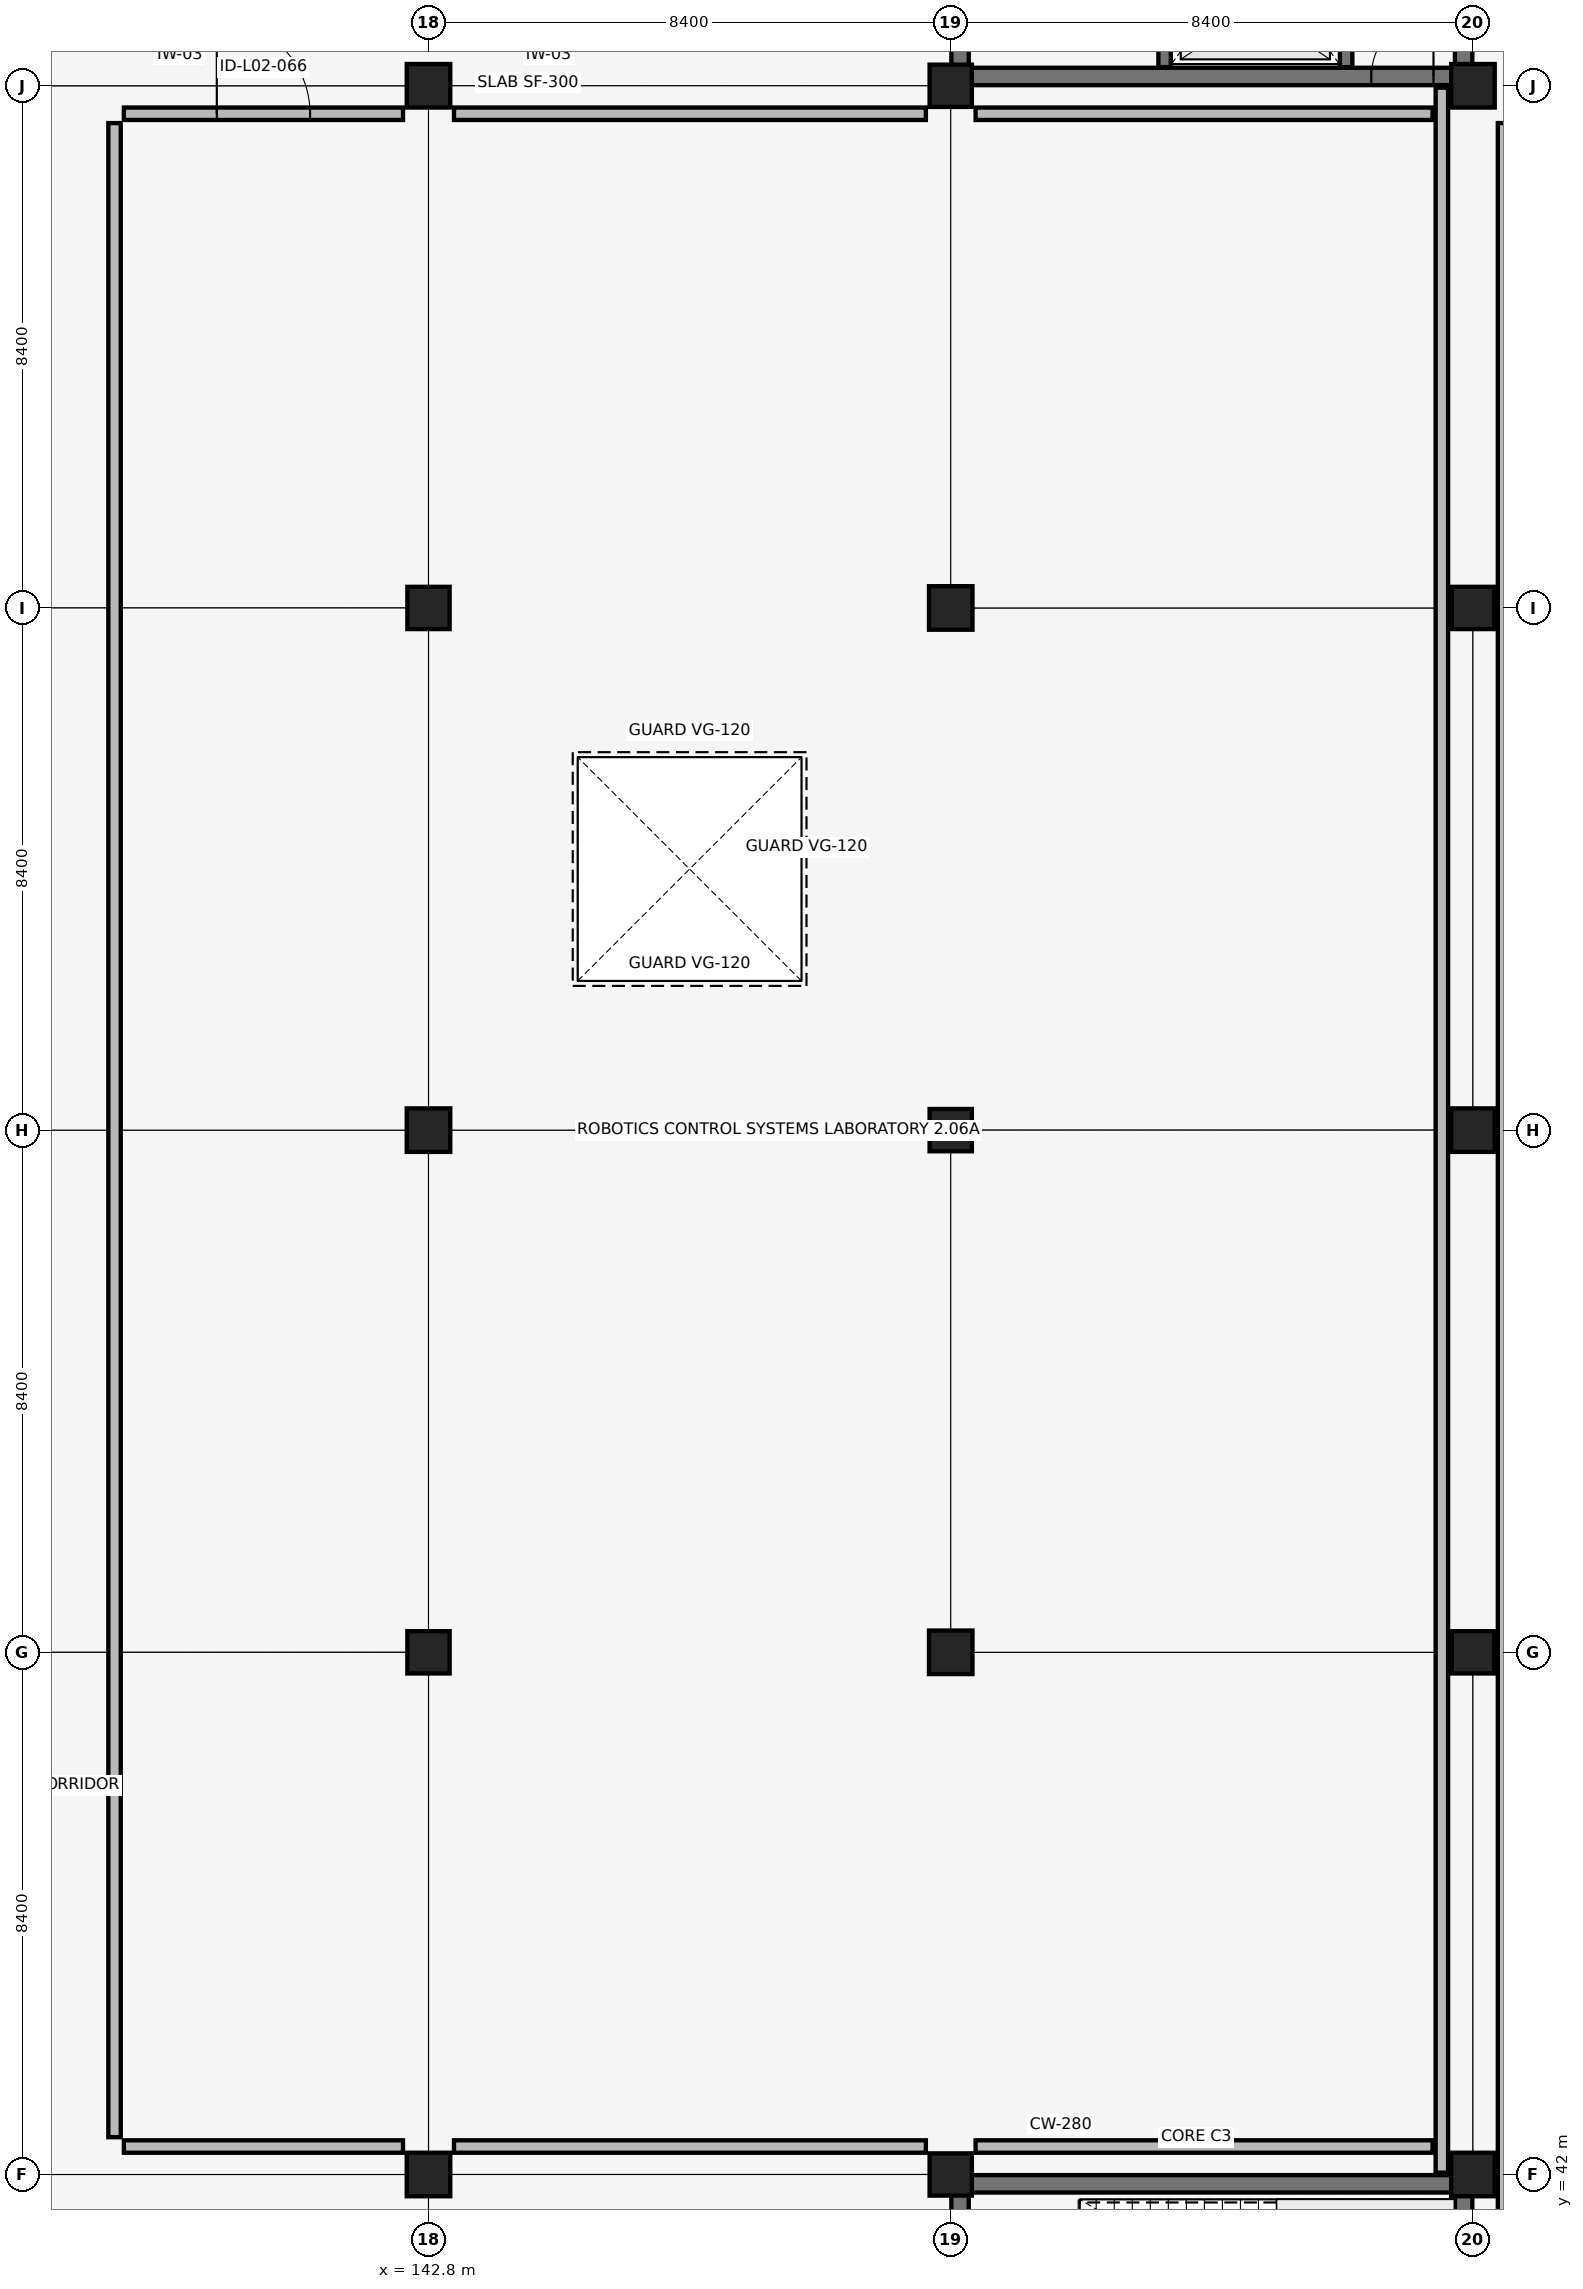
"""IFC4 building model, lengths in metres.
Left out: names, types, materials, properties, quantities, classifications, styles, units other than length and angle.
Written with IfcOpenShell. Run it as: python <this file> out.ifc"""

import sys

from ifc_helpers import new_model, si_unit, direction, frame, frame_2d, origin, origin_2d, place, context, subcontext, project, spatial, rectangle, extrude, element, fill, save


model = new_model("IFC4")
c1 = context("Model", 3, precision=1e-05, world=origin(), true_north=direction((0.0, 1.0)))
c2 = subcontext(c1, "Body", "Model", "MODEL_VIEW")
j1 = project(units=[si_unit("LENGTHUNIT", "METRE"), si_unit("PLANEANGLEUNIT", "RADIAN")], contexts=[c1])
p1 = place(None, origin())
s1 = spatial("IfcSite", under=j1, at=p1, CompositionType="ELEMENT")
p2 = place(p1, origin())
s2 = spatial("IfcBuilding", under=s1, at=p2, CompositionType="ELEMENT")
p3 = place(p2, frame((0.0, 0.0, 9.86)))
s3 = spatial("IfcBuildingStorey", under=s2, at=p3, CompositionType="ELEMENT", Elevation=9.86)
p4 = place(p3, frame((151.35, 41.85, 0.0), z_axis=(0.0, 0.0, 1.0), x_axis=(1.0, 0.0, 0.0)))
e1 = element("IfcWall", 1, at=p4, inside=s3, PredefinedType="SHEAR", context=c2, shape_type="SweptSolid", body=[
    extrude(rectangle(XDim=8.1, YDim=0.28, at=frame_2d((4.05, 0.0))), origin(), (0.0, 0.0, 1.0), 3.78),
])
p5 = place(p3, frame((151.35, 33.75, 0.0), z_axis=(0.0, 0.0, 1.0), x_axis=(0.0, 1.0, 0.0)))
e2 = element("IfcWall", 2, at=p5, inside=s3, PredefinedType="SHEAR", context=c2, shape_type="SweptSolid", body=[
    extrude(rectangle(XDim=8.1, YDim=0.28, at=frame_2d((4.05, 0.0))), origin(), (0.0, 0.0, 1.0), 3.78),
])
p6 = place(p5, frame((1.325, 0.0, 0.0)))
e3 = element("IfcOpeningElement", 3, at=p6, cuts=e2, PredefinedType="OPENING", context=c2, shape_type="SweptSolid", body=[
    extrude(rectangle(XDim=1.45, YDim=2.15, at=frame_2d((0.725, 1.075))), frame((0.0, 0.15, 0.0), z_axis=(0.0, -1.0, 0.0), x_axis=(1.0, 0.0, 0.0)), (0.0, 0.0, 1.0), 0.3),
])
p7 = place(p3, frame((159.45, 33.75, 0.0), z_axis=(0.0, 0.0, 1.0), x_axis=(0.0, 1.0, 0.0)))
e4 = element("IfcWall", 4, at=p7, inside=s3, PredefinedType="SHEAR", context=c2, shape_type="SweptSolid", body=[
    extrude(rectangle(XDim=8.1, YDim=0.28, at=frame_2d((4.05, 0.0))), origin(), (0.0, 0.0, 1.0), 3.78),
])
p8 = place(p3, frame((151.35, 75.75, 0.0), z_axis=(0.0, 0.0, 1.0), x_axis=(1.0, 0.0, 0.0)))
e5 = element("IfcWall", 5, at=p8, inside=s3, PredefinedType="SHEAR", context=c2, shape_type="SweptSolid", body=[
    extrude(rectangle(XDim=8.1, YDim=0.28, at=frame_2d((4.05, 0.0))), origin(), (0.0, 0.0, 1.0), 3.78),
])
p9 = place(p8, frame((6.615, 0.0, 0.0)))
e6 = element("IfcOpeningElement", 6, at=p9, cuts=e5, PredefinedType="OPENING", context=c2, shape_type="SweptSolid", body=[
    extrude(rectangle(XDim=1.0, YDim=2.15, at=frame_2d((0.5, 1.075))), frame((0.0, 0.15, 0.0), z_axis=(0.0, -1.0, 0.0), x_axis=(1.0, 0.0, 0.0)), (0.0, 0.0, 1.0), 0.3),
])
p10 = place(p3, frame((151.35, 75.75, 0.0), z_axis=(0.0, 0.0, 1.0), x_axis=(0.0, 1.0, 0.0)))
e7 = element("IfcWall", 7, at=p10, inside=s3, PredefinedType="SHEAR", context=c2, shape_type="SweptSolid", body=[
    extrude(rectangle(XDim=8.1, YDim=0.28, at=frame_2d((4.05, 0.0))), origin(), (0.0, 0.0, 1.0), 3.78),
])
p11 = place(p10, frame((1.325, 0.0, 0.0)))
e8 = element("IfcOpeningElement", 8, at=p11, cuts=e7, PredefinedType="OPENING", context=c2, shape_type="SweptSolid", body=[
    extrude(rectangle(XDim=1.45, YDim=2.15, at=frame_2d((0.725, 1.075))), frame((0.0, 0.15, 0.0), z_axis=(0.0, -1.0, 0.0), x_axis=(1.0, 0.0, 0.0)), (0.0, 0.0, 1.0), 0.3),
])
p12 = place(p3, frame((159.45, 75.75, 0.0), z_axis=(0.0, 0.0, 1.0), x_axis=(0.0, 1.0, 0.0)))
e9 = element("IfcWall", 9, at=p12, inside=s3, PredefinedType="SHEAR", context=c2, shape_type="SweptSolid", body=[
    extrude(rectangle(XDim=8.1, YDim=0.28, at=frame_2d((4.05, 0.0))), origin(), (0.0, 0.0, 1.0), 3.78),
])
p13 = place(p3, frame((142.8, 42.0, 0.0), z_axis=(0.0, 0.0, 1.0), x_axis=(1.0, 0.0, 0.0)))
e10 = element("IfcColumn", 10, at=p13, inside=s3, PredefinedType="COLUMN", context=c2, shape_type="SweptSolid", body=[
    extrude(rectangle(XDim=0.7, YDim=0.7, at=origin_2d()), origin(), (0.0, 0.0, 1.0), 3.78),
])
p14 = place(p3, frame((142.8, 50.4, 0.0), z_axis=(0.0, 0.0, 1.0), x_axis=(1.0, 0.0, 0.0)))
e11 = element("IfcColumn", 11, at=p14, inside=s3, PredefinedType="COLUMN", context=c2, shape_type="SweptSolid", body=[
    extrude(rectangle(XDim=0.68, YDim=0.68, at=origin_2d()), origin(), (0.0, 0.0, 1.0), 3.78),
])
p15 = place(p3, frame((142.8, 58.8, 0.0), z_axis=(0.0, 0.0, 1.0), x_axis=(1.0, 0.0, 0.0)))
e12 = element("IfcColumn", 12, at=p15, inside=s3, PredefinedType="COLUMN", context=c2, shape_type="SweptSolid", body=[
    extrude(rectangle(XDim=0.7, YDim=0.7, at=origin_2d()), origin(), (0.0, 0.0, 1.0), 3.78),
])
p16 = place(p3, frame((142.8, 67.2, 0.0), z_axis=(0.0, 0.0, 1.0), x_axis=(1.0, 0.0, 0.0)))
e13 = element("IfcColumn", 13, at=p16, inside=s3, PredefinedType="COLUMN", context=c2, shape_type="SweptSolid", body=[
    extrude(rectangle(XDim=0.68, YDim=0.68, at=origin_2d()), origin(), (0.0, 0.0, 1.0), 3.78),
])
p17 = place(p3, frame((142.8, 75.6, 0.0), z_axis=(0.0, 0.0, 1.0), x_axis=(1.0, 0.0, 0.0)))
e14 = element("IfcColumn", 14, at=p17, inside=s3, PredefinedType="COLUMN", context=c2, shape_type="SweptSolid", body=[
    extrude(rectangle(XDim=0.7, YDim=0.7, at=origin_2d()), origin(), (0.0, 0.0, 1.0), 3.78),
])
p18 = place(p3, frame((151.2, 42.0, 0.0), z_axis=(0.0, 0.0, 1.0), x_axis=(1.0, 0.0, 0.0)))
e15 = element("IfcColumn", 15, at=p18, inside=s3, PredefinedType="COLUMN", context=c2, shape_type="SweptSolid", body=[
    extrude(rectangle(XDim=0.68, YDim=0.68, at=origin_2d()), origin(), (0.0, 0.0, 1.0), 3.78),
])
p19 = place(p3, frame((151.2, 50.4, 0.0), z_axis=(0.0, 0.0, 1.0), x_axis=(1.0, 0.0, 0.0)))
e16 = element("IfcColumn", 16, at=p19, inside=s3, PredefinedType="COLUMN", context=c2, shape_type="SweptSolid", body=[
    extrude(rectangle(XDim=0.7, YDim=0.7, at=origin_2d()), origin(), (0.0, 0.0, 1.0), 3.78),
])
p20 = place(p3, frame((151.2, 58.8, 0.0), z_axis=(0.0, 0.0, 1.0), x_axis=(1.0, 0.0, 0.0)))
e17 = element("IfcColumn", 17, at=p20, inside=s3, PredefinedType="COLUMN", context=c2, shape_type="SweptSolid", body=[
    extrude(rectangle(XDim=0.68, YDim=0.68, at=origin_2d()), origin(), (0.0, 0.0, 1.0), 3.78),
])
p21 = place(p3, frame((151.2, 67.2, 0.0), z_axis=(0.0, 0.0, 1.0), x_axis=(1.0, 0.0, 0.0)))
e18 = element("IfcColumn", 18, at=p21, inside=s3, PredefinedType="COLUMN", context=c2, shape_type="SweptSolid", body=[
    extrude(rectangle(XDim=0.7, YDim=0.7, at=origin_2d()), origin(), (0.0, 0.0, 1.0), 3.78),
])
p22 = place(p3, frame((151.2, 75.6, 0.0), z_axis=(0.0, 0.0, 1.0), x_axis=(1.0, 0.0, 0.0)))
e19 = element("IfcColumn", 19, at=p22, inside=s3, PredefinedType="COLUMN", context=c2, shape_type="SweptSolid", body=[
    extrude(rectangle(XDim=0.68, YDim=0.68, at=origin_2d()), origin(), (0.0, 0.0, 1.0), 3.78),
])
p23 = place(p3, frame((159.6, 42.0, 0.0), z_axis=(0.0, 0.0, 1.0), x_axis=(1.0, 0.0, 0.0)))
e20 = element("IfcColumn", 20, at=p23, inside=s3, PredefinedType="COLUMN", context=c2, shape_type="SweptSolid", body=[
    extrude(rectangle(XDim=0.7, YDim=0.7, at=origin_2d()), origin(), (0.0, 0.0, 1.0), 3.78),
])
p24 = place(p3, frame((159.6, 50.4, 0.0), z_axis=(0.0, 0.0, 1.0), x_axis=(1.0, 0.0, 0.0)))
e21 = element("IfcColumn", 21, at=p24, inside=s3, PredefinedType="COLUMN", context=c2, shape_type="SweptSolid", body=[
    extrude(rectangle(XDim=0.68, YDim=0.68, at=origin_2d()), origin(), (0.0, 0.0, 1.0), 3.78),
])
p25 = place(p3, frame((159.6, 58.8, 0.0), z_axis=(0.0, 0.0, 1.0), x_axis=(1.0, 0.0, 0.0)))
e22 = element("IfcColumn", 22, at=p25, inside=s3, PredefinedType="COLUMN", context=c2, shape_type="SweptSolid", body=[
    extrude(rectangle(XDim=0.7, YDim=0.7, at=origin_2d()), origin(), (0.0, 0.0, 1.0), 3.78),
])
p26 = place(p3, frame((159.6, 67.2, 0.0), z_axis=(0.0, 0.0, 1.0), x_axis=(1.0, 0.0, 0.0)))
e23 = element("IfcColumn", 23, at=p26, inside=s3, PredefinedType="COLUMN", context=c2, shape_type="SweptSolid", body=[
    extrude(rectangle(XDim=0.68, YDim=0.68, at=origin_2d()), origin(), (0.0, 0.0, 1.0), 3.78),
])
p27 = place(p3, frame((159.6, 75.6, 0.0), z_axis=(0.0, 0.0, 1.0), x_axis=(1.0, 0.0, 0.0)))
e24 = element("IfcColumn", 24, at=p27, inside=s3, PredefinedType="COLUMN", context=c2, shape_type="SweptSolid", body=[
    extrude(rectangle(XDim=0.7, YDim=0.7, at=origin_2d()), origin(), (0.0, 0.0, 1.0), 3.78),
])
p28 = place(p3, frame((154.64, 75.9, 0.0), z_axis=(0.0, 0.0, 1.0), x_axis=(0.0, 1.0, 0.0)))
e25 = element("IfcWall", 25, at=p28, inside=s3, PredefinedType="SHEAR", context=c2, shape_type="SweptSolid", body=[
    extrude(rectangle(XDim=3.8, YDim=0.2, at=frame_2d((1.9, 0.0))), origin(), (0.0, 0.0, 1.0), 2.95),
])
p29 = place(p28, frame((0.375, 0.0, 0.0)))
e26 = element("IfcOpeningElement", 26, at=p29, cuts=e25, PredefinedType="OPENING", context=c2, shape_type="SweptSolid", body=[
    extrude(rectangle(XDim=1.1, YDim=2.15, at=frame_2d((0.55, 1.075))), frame((0.0, 0.11, 0.0), z_axis=(0.0, -1.0, 0.0), x_axis=(1.0, 0.0, 0.0)), (0.0, 0.0, 1.0), 0.22),
])
p30 = place(p28, frame((2.325, 0.0, 0.0)))
e27 = element("IfcOpeningElement", 27, at=p30, cuts=e25, PredefinedType="OPENING", context=c2, shape_type="SweptSolid", body=[
    extrude(rectangle(XDim=1.1, YDim=2.15, at=frame_2d((0.55, 1.075))), frame((0.0, 0.11, 0.0), z_axis=(0.0, -1.0, 0.0), x_axis=(1.0, 0.0, 0.0)), (0.0, 0.0, 1.0), 0.22),
])
p31 = place(p3, frame((157.56, 75.9, 0.0), z_axis=(0.0, 0.0, 1.0), x_axis=(0.0, 1.0, 0.0)))
e28 = element("IfcWall", 28, at=p31, inside=s3, PredefinedType="SHEAR", context=c2, shape_type="SweptSolid", body=[
    extrude(rectangle(XDim=3.8, YDim=0.2, at=frame_2d((1.9, 0.0))), origin(), (0.0, 0.0, 1.0), 2.95),
])
p32 = place(p3, frame((137.9, 75.15, 0.0), z_axis=(0.0, 0.0, 1.0), x_axis=(1.0, 0.0, 0.0)))
e29 = element("IfcWall", 29, at=p32, inside=s3, PredefinedType="PARTITIONING", context=c2, shape_type="SweptSolid", body=[
    extrude(rectangle(XDim=4.49, YDim=0.2, at=frame_2d((2.245, 0.0))), origin(), (0.0, 0.0, 1.0), 3.78),
])
p33 = place(p32, frame((1.495, 0.0, 0.0)))
e30 = element("IfcOpeningElement", 30, at=p33, cuts=e29, PredefinedType="OPENING", context=c2, shape_type="SweptSolid", body=[
    extrude(rectangle(XDim=1.5, YDim=2.2, at=frame_2d((0.75, 1.1))), frame((0.0, 0.11, 0.0), z_axis=(0.0, -1.0, 0.0), x_axis=(1.0, 0.0, 0.0)), (0.0, 0.0, 1.0), 0.22),
])
p34 = place(p3, frame((143.21, 75.15, 0.0), z_axis=(0.0, 0.0, 1.0), x_axis=(1.0, 0.0, 0.0)))
e31 = element("IfcWall", 31, at=p34, inside=s3, PredefinedType="PARTITIONING", context=c2, shape_type="SweptSolid", body=[
    extrude(rectangle(XDim=7.59, YDim=0.2, at=frame_2d((3.795, 0.0))), origin(), (0.0, 0.0, 1.0), 3.78),
])
p35 = place(p3, frame((151.6, 75.15, 0.0), z_axis=(0.0, 0.0, 1.0), x_axis=(1.0, 0.0, 0.0)))
e32 = element("IfcWall", 32, at=p35, inside=s3, PredefinedType="PARTITIONING", context=c2, shape_type="SweptSolid", body=[
    extrude(rectangle(XDim=7.35, YDim=0.2, at=frame_2d((3.675, 0.0))), origin(), (0.0, 0.0, 1.0), 3.78),
])
p36 = place(p3, frame((137.75, 42.6, 0.0), z_axis=(0.0, 0.0, 1.0), x_axis=(0.0, 1.0, 0.0)))
e33 = element("IfcWall", 33, at=p36, inside=s3, PredefinedType="PARTITIONING", context=c2, shape_type="SweptSolid", body=[
    extrude(rectangle(XDim=32.4, YDim=0.2, at=frame_2d((16.2, 0.0))), origin(), (0.0, 0.0, 1.0), 2.91),
])
p37 = place(p3, frame((137.9, 42.45, 0.0), z_axis=(0.0, 0.0, 1.0), x_axis=(1.0, 0.0, 0.0)))
e34 = element("IfcWall", 34, at=p37, inside=s3, PredefinedType="PARTITIONING", context=c2, shape_type="SweptSolid", body=[
    extrude(rectangle(XDim=4.49, YDim=0.2, at=frame_2d((2.245, 0.0))), origin(), (0.0, 0.0, 1.0), 3.78),
])
p38 = place(p3, frame((143.21, 42.45, 0.0), z_axis=(0.0, 0.0, 1.0), x_axis=(1.0, 0.0, 0.0)))
e35 = element("IfcWall", 35, at=p38, inside=s3, PredefinedType="PARTITIONING", context=c2, shape_type="SweptSolid", body=[
    extrude(rectangle(XDim=7.59, YDim=0.2, at=frame_2d((3.795, 0.0))), origin(), (0.0, 0.0, 1.0), 3.78),
])
p39 = place(p3, frame((151.6, 42.45, 0.0), z_axis=(0.0, 0.0, 1.0), x_axis=(1.0, 0.0, 0.0)))
e36 = element("IfcWall", 36, at=p39, inside=s3, PredefinedType="PARTITIONING", context=c2, shape_type="SweptSolid", body=[
    extrude(rectangle(XDim=7.35, YDim=0.2, at=frame_2d((3.675, 0.0))), origin(), (0.0, 0.0, 1.0), 3.78),
])
p40 = place(p3, frame((159.1, 42.03, 0.0), z_axis=(0.0, 0.0, 1.0), x_axis=(0.0, 1.0, 0.0)))
e37 = element("IfcWall", 37, at=p40, inside=s3, PredefinedType="PARTITIONING", context=c2, shape_type="SweptSolid", body=[
    extrude(rectangle(XDim=33.54, YDim=0.2, at=frame_2d((16.77, 0.0))), origin(), (0.0, 0.0, 1.0), 2.91),
])
p41 = place(p3, frame((160.1, 34.2, 0.0), z_axis=(0.0, 0.0, 1.0), x_axis=(0.0, 1.0, 0.0)))
e38 = element("IfcWall", 38, at=p41, inside=s3, PredefinedType="PARTITIONING", context=c2, shape_type="SweptSolid", body=[
    extrude(rectangle(XDim=40.8, YDim=0.2, at=frame_2d((20.4, 0.0))), origin(), (0.0, 0.0, 1.0), 2.91),
])
p42 = place(p9, origin())
e39 = element("IfcDoor", 39, at=p42, inside=s3, OperationType="SINGLE_SWING_RIGHT", PredefinedType="DOOR", context=c2, shape_type="SweptSolid", body=[
    extrude(rectangle(XDim=1.0, YDim=2.15, at=frame_2d((0.5, 1.075))), frame((0.0, 0.025, 0.0), z_axis=(0.0, -1.0, 0.0), x_axis=(1.0, 0.0, 0.0)), (0.0, 0.0, 1.0), 0.05),
])
fill(e6, e39)
p43 = place(p33, origin())
e40 = element("IfcDoor", 40, at=p43, inside=s3, OperationType="DOUBLE_DOOR_SINGLE_SWING", PredefinedType="DOOR", context=c2, shape_type="SweptSolid", body=[
    extrude(rectangle(XDim=1.5, YDim=2.2, at=frame_2d((0.75, 1.1))), frame((0.0, 0.025, 0.0), z_axis=(0.0, -1.0, 0.0), x_axis=(1.0, 0.0, 0.0)), (0.0, 0.0, 1.0), 0.05),
])
fill(e30, e40)
save(model, sys.argv[1])
